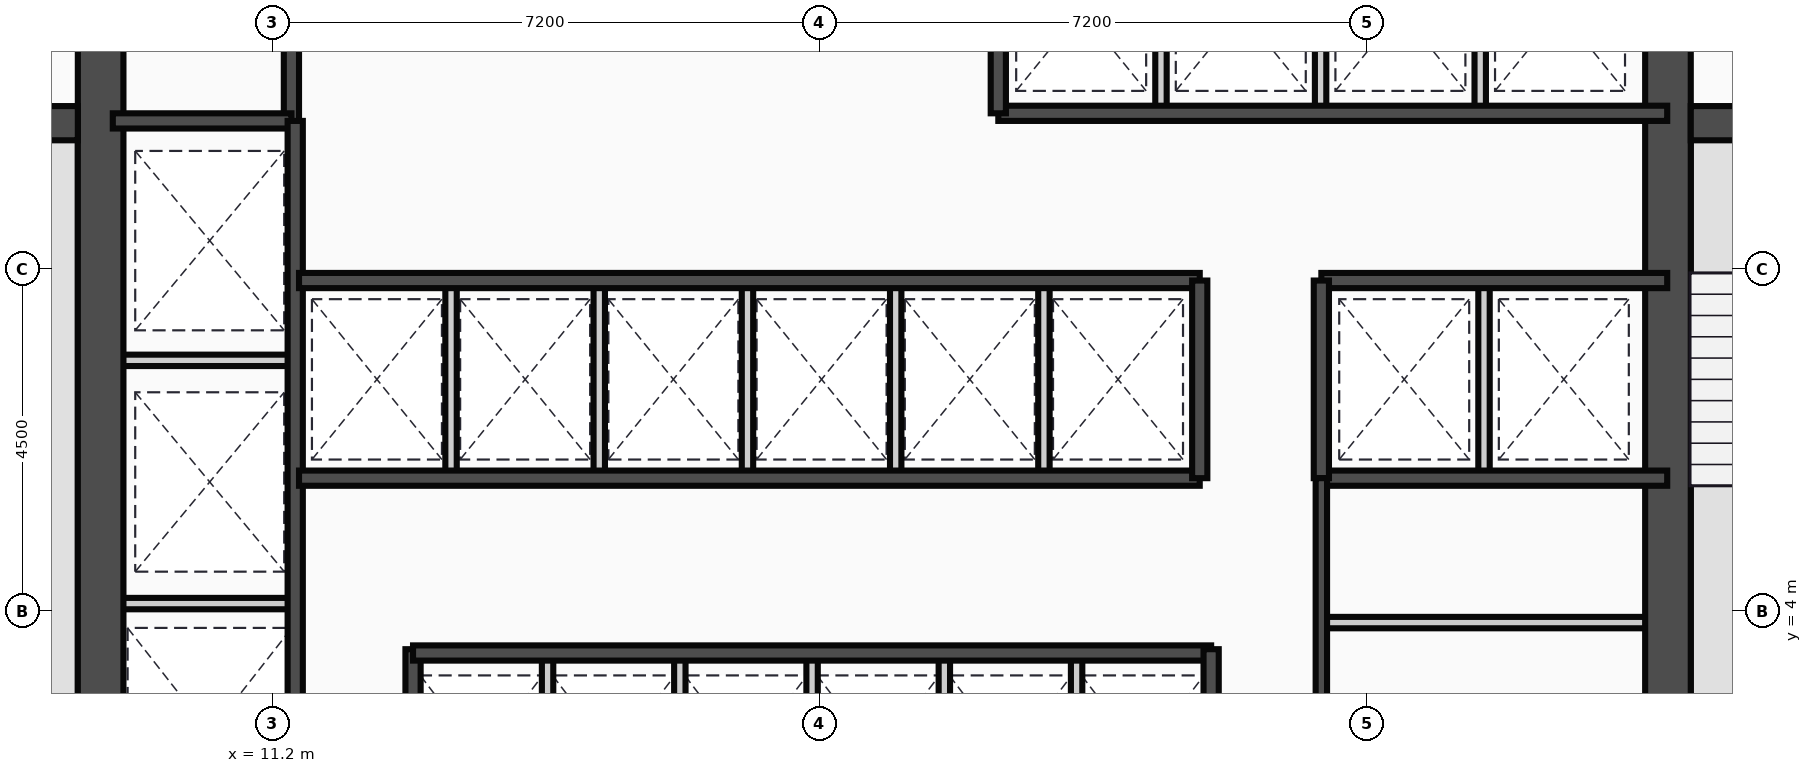
"""IFC4 building model, lengths in metres.
Left out: names, types, materials, properties, quantities, classifications, styles, units other than length and angle.
Written with IfcOpenShell. Run it as: python <this file> out.ifc"""

import sys

from ifc_helpers import new_model, si_unit, direction, frame, frame_2d, origin, place, context, subcontext, project, spatial, rectangle, extrude, source, transform, mapped, element, fill, save


model = new_model("IFC4")
c1 = context("Model", 3, precision=1e-05, world=origin(), true_north=direction((0.0, 1.0)))
c2 = subcontext(c1, "Body", "Model", "MODEL_VIEW")
j1 = project(units=[si_unit("LENGTHUNIT", "METRE"), si_unit("PLANEANGLEUNIT", "RADIAN")], contexts=[c1])
p1 = place(None, origin())
s1 = spatial("IfcSite", under=j1, at=p1, CompositionType="ELEMENT")
p2 = place(p1, origin())
s2 = spatial("IfcBuilding", under=s1, at=p2, CompositionType="ELEMENT")
p3 = place(p2, frame((0.0, 0.0, 32.5)))
s3 = spatial("IfcBuildingStorey", under=s2, at=p3, CompositionType="ELEMENT", Elevation=32.5)
m1 = source(origin(), c2, "Body", "SweptSolid", [
    extrude(rectangle(XDim=12.2, YDim=0.6, at=frame_2d((6.1, 0.0))), origin(), (0.0, 0.0, 1.0), 3.65),
])
for number, where, z_axis, x_axis in (
    (1, (8.94, 0.9, 0.0), (0.0, 0.0, 1.0), (0.0, 1.0, 0.0)),
    (2, (29.56, 0.9, 0.0), (0.0, 0.0, 1.0), (0.0, 1.0, 0.0)),
):
    element("IfcWall", number, at=place(p3, frame(where, z_axis=z_axis, x_axis=x_axis)), inside=s3, PredefinedType="SHEAR", context=c2, shape_type="MappedRepresentation", body=[
        mapped(m1, transform((0.0, 0.0, 0.0))),
    ])
m2 = source(origin(), c2, "Body", "SweptSolid", [
    extrude(rectangle(XDim=3.39, YDim=0.45, at=frame_2d((1.695, 0.0))), origin(), (0.0, 0.0, 1.0), 3.65),
])
p4 = place(p3, frame((5.25, 10.42, 0.0), z_axis=(0.0, 0.0, 1.0), x_axis=(1.0, 0.0, 0.0)))
e3 = element("IfcWall", 3, at=p4, inside=s3, PredefinedType="SHEAR", context=c2, shape_type="MappedRepresentation", body=[
    mapped(m2, transform((0.0, 0.0, 0.0))),
])
p5 = place(p4, frame((1.05, 0.0, 0.0)))
e4 = element("IfcOpeningElement", 4, at=p5, cuts=e3, PredefinedType="OPENING", context=c2, shape_type="SweptSolid", body=[
    extrude(rectangle(XDim=1.1, YDim=2.15, at=frame_2d((0.55, 1.075))), frame((0.0, 0.235, 0.0), z_axis=(0.0, -1.0, 0.0), x_axis=(1.0, 0.0, 0.0)), (0.0, 0.0, 1.0), 0.47),
])
p6 = place(p3, frame((29.86, 10.42, 0.0), z_axis=(0.0, 0.0, 1.0), x_axis=(1.0, 0.0, 0.0)))
e5 = element("IfcWall", 5, at=p6, inside=s3, PredefinedType="SHEAR", context=c2, shape_type="MappedRepresentation", body=[
    mapped(m2, transform((0.0, 0.0, 0.0))),
])
p7 = place(p6, frame((1.1, 0.0, 0.0)))
e6 = element("IfcOpeningElement", 6, at=p7, cuts=e5, PredefinedType="OPENING", context=c2, shape_type="SweptSolid", body=[
    extrude(rectangle(XDim=1.1, YDim=2.15, at=frame_2d((0.55, 1.075))), frame((0.0, 0.235, 0.0), z_axis=(0.0, -1.0, 0.0), x_axis=(1.0, 0.0, 0.0)), (0.0, 0.0, 1.0), 0.47),
])
m3 = source(origin(), c2, "Body", "SweptSolid", [
    extrude(rectangle(XDim=3.18, YDim=0.2, at=frame_2d((1.59, 0.0))), origin(), (0.0, 0.0, 1.0), 3.4),
])
p8 = place(p3, frame((11.45, 10.42, 0.0), z_axis=(0.0, 0.0, 1.0), x_axis=(0.0, 1.0, 0.0)))
e7 = element("IfcWall", 7, at=p8, inside=s3, PredefinedType="PARTITIONING", context=c2, shape_type="MappedRepresentation", body=[
    mapped(m3, transform((0.0, 0.0, 0.0))),
])
m4 = source(origin(), c2, "Body", "SweptSolid", [
    extrude(rectangle(XDim=2.35, YDim=0.2, at=frame_2d((1.175, 0.0))), origin(), (0.0, 0.0, 1.0), 3.4),
])
p9 = place(p3, frame((9.1, 10.45, 0.0), z_axis=(0.0, 0.0, 1.0), x_axis=(1.0, 0.0, 0.0)))
e8 = element("IfcWall", 8, at=p9, inside=s3, PredefinedType="PARTITIONING", context=c2, shape_type="MappedRepresentation", body=[
    mapped(m4, transform((0.0, 0.0, 0.0))),
])
p10 = place(p9, frame((0.55, 0.0, 0.0)))
e9 = element("IfcOpeningElement", 9, at=p10, cuts=e8, PredefinedType="OPENING", context=c2, shape_type="SweptSolid", body=[
    extrude(rectangle(XDim=1.1, YDim=2.15, at=frame_2d((0.55, 1.075))), frame((0.0, 0.11, 0.0), z_axis=(0.0, -1.0, 0.0), x_axis=(1.0, 0.0, 0.0)), (0.0, 0.0, 1.0), 0.22),
])
m5 = source(origin(), c2, "Body", "SweptSolid", [
    extrude(rectangle(XDim=9.6, YDim=0.2, at=frame_2d((4.8, 0.0))), origin(), (0.0, 0.0, 1.0), 3.4),
])
p11 = place(p3, frame((11.5, 0.85, 0.0), z_axis=(0.0, 0.0, 1.0), x_axis=(0.0, 1.0, 0.0)))
e10 = element("IfcWall", 10, at=p11, inside=s3, PredefinedType="PARTITIONING", context=c2, shape_type="MappedRepresentation", body=[
    mapped(m5, transform((0.0, 0.0, 0.0))),
])
p12 = place(p11, frame((4.2, 0.0, 0.0)))
e11 = element("IfcOpeningElement", 11, at=p12, cuts=e10, PredefinedType="OPENING", context=c2, shape_type="SweptSolid", body=[
    extrude(rectangle(XDim=1.1, YDim=2.15, at=frame_2d((0.55, 1.075))), frame((0.0, 0.11, 0.0), z_axis=(0.0, -1.0, 0.0), x_axis=(1.0, 0.0, 0.0)), (0.0, 0.0, 1.0), 0.22),
])
p13 = place(p11, frame((0.9, 0.0, 0.0)))
e12 = element("IfcOpeningElement", 12, at=p13, cuts=e10, PredefinedType="OPENING", context=c2, shape_type="SweptSolid", body=[
    extrude(rectangle(XDim=1.2, YDim=2.15, at=frame_2d((0.6, 1.075))), frame((0.0, 0.11, 0.0), z_axis=(0.0, -1.0, 0.0), x_axis=(1.0, 0.0, 0.0)), (0.0, 0.0, 1.0), 0.22),
])
m6 = source(origin(), c2, "Body", "SweptSolid", [
    extrude(rectangle(XDim=2.4, YDim=0.15, at=frame_2d((1.2, 0.0))), origin(), (0.0, 0.0, 1.0), 3.4),
])
for number, where, z_axis, x_axis in (
    (13, (9.1, 4.1, 0.0), (0.0, 0.0, 1.0), (1.0, 0.0, 0.0)),
    (14, (9.1, 7.3, 0.0), (0.0, 0.0, 1.0), (1.0, 0.0, 0.0)),
):
    element("IfcWall", number, at=place(p3, frame(where, z_axis=z_axis, x_axis=x_axis)), inside=s3, PredefinedType="PARTITIONING", context=c2, shape_type="MappedRepresentation", body=[
        mapped(m6, transform((0.0, 0.0, 0.0))),
    ])
m7 = source(origin(), c2, "Body", "SweptSolid", [
    extrude(rectangle(XDim=2.65, YDim=0.2, at=frame_2d((1.325, 0.0))), origin(), (0.0, 0.0, 1.0), 3.4),
])
p14 = place(p3, frame((13.05, 0.85, 0.0), z_axis=(0.0, 0.0, 1.0), x_axis=(0.0, 1.0, 0.0)))
e15 = element("IfcWall", 15, at=p14, inside=s3, PredefinedType="PARTITIONING", context=c2, shape_type="MappedRepresentation", body=[
    mapped(m7, transform((0.0, 0.0, 0.0))),
])
m8 = source(origin(), c2, "Body", "SweptSolid", [
    extrude(rectangle(XDim=10.5, YDim=0.2, at=frame_2d((5.25, 0.0))), origin(), (0.0, 0.0, 1.0), 3.4),
])
p15 = place(p3, frame((13.05, 3.45, 0.0), z_axis=(0.0, 0.0, 1.0), x_axis=(1.0, 0.0, 0.0)))
e16 = element("IfcWall", 16, at=p15, inside=s3, PredefinedType="PARTITIONING", context=c2, shape_type="MappedRepresentation", body=[
    mapped(m8, transform((0.0, 0.0, 0.0))),
])
p16 = place(p15, frame((0.38, 0.0, 0.0)))
e17 = element("IfcOpeningElement", 17, at=p16, cuts=e16, PredefinedType="OPENING", context=c2, shape_type="SweptSolid", body=[
    extrude(rectangle(XDim=1.05, YDim=2.15, at=frame_2d((0.525, 1.075))), frame((0.0, 0.11, 0.0), z_axis=(0.0, -1.0, 0.0), x_axis=(1.0, 0.0, 0.0)), (0.0, 0.0, 1.0), 0.22),
])
p17 = place(p15, frame((2.12, 0.0, 0.0)))
e18 = element("IfcOpeningElement", 18, at=p17, cuts=e16, PredefinedType="OPENING", context=c2, shape_type="SweptSolid", body=[
    extrude(rectangle(XDim=1.05, YDim=2.15, at=frame_2d((0.525, 1.075))), frame((0.0, 0.11, 0.0), z_axis=(0.0, -1.0, 0.0), x_axis=(1.0, 0.0, 0.0)), (0.0, 0.0, 1.0), 0.22),
])
p18 = place(p15, frame((3.86, 0.0, 0.0)))
e19 = element("IfcOpeningElement", 19, at=p18, cuts=e16, PredefinedType="OPENING", context=c2, shape_type="SweptSolid", body=[
    extrude(rectangle(XDim=1.05, YDim=2.15, at=frame_2d((0.525, 1.075))), frame((0.0, 0.11, 0.0), z_axis=(0.0, -1.0, 0.0), x_axis=(1.0, 0.0, 0.0)), (0.0, 0.0, 1.0), 0.22),
])
p19 = place(p15, frame((5.6, 0.0, 0.0)))
e20 = element("IfcOpeningElement", 20, at=p19, cuts=e16, PredefinedType="OPENING", context=c2, shape_type="SweptSolid", body=[
    extrude(rectangle(XDim=1.05, YDim=2.15, at=frame_2d((0.525, 1.075))), frame((0.0, 0.11, 0.0), z_axis=(0.0, -1.0, 0.0), x_axis=(1.0, 0.0, 0.0)), (0.0, 0.0, 1.0), 0.22),
])
p20 = place(p15, frame((7.34, 0.0, 0.0)))
e21 = element("IfcOpeningElement", 21, at=p20, cuts=e16, PredefinedType="OPENING", context=c2, shape_type="SweptSolid", body=[
    extrude(rectangle(XDim=1.05, YDim=2.15, at=frame_2d((0.525, 1.075))), frame((0.0, 0.11, 0.0), z_axis=(0.0, -1.0, 0.0), x_axis=(1.0, 0.0, 0.0)), (0.0, 0.0, 1.0), 0.22),
])
p21 = place(p15, frame((9.08, 0.0, 0.0)))
e22 = element("IfcOpeningElement", 22, at=p21, cuts=e16, PredefinedType="OPENING", context=c2, shape_type="SweptSolid", body=[
    extrude(rectangle(XDim=1.05, YDim=2.15, at=frame_2d((0.525, 1.075))), frame((0.0, 0.11, 0.0), z_axis=(0.0, -1.0, 0.0), x_axis=(1.0, 0.0, 0.0)), (0.0, 0.0, 1.0), 0.22),
])
p22 = place(p3, frame((23.55, 0.85, 0.0), z_axis=(0.0, 0.0, 1.0), x_axis=(0.0, 1.0, 0.0)))
e23 = element("IfcWall", 23, at=p22, inside=s3, PredefinedType="PARTITIONING", context=c2, shape_type="MappedRepresentation", body=[
    mapped(m7, transform((0.0, 0.0, 0.0))),
])
m9 = source(origin(), c2, "Body", "SweptSolid", [
    extrude(rectangle(XDim=2.6, YDim=0.15, at=frame_2d((1.3, 0.0))), origin(), (0.0, 0.0, 1.0), 3.4),
])
for number, where, z_axis, x_axis in (
    (24, (14.82, 0.85, 0.0), (0.0, 0.0, 1.0), (0.0, 1.0, 0.0)),
    (25, (16.56, 0.85, 0.0), (0.0, 0.0, 1.0), (0.0, 1.0, 0.0)),
    (26, (18.3, 0.85, 0.0), (0.0, 0.0, 1.0), (0.0, 1.0, 0.0)),
    (27, (20.04, 0.85, 0.0), (0.0, 0.0, 1.0), (0.0, 1.0, 0.0)),
    (28, (21.78, 0.85, 0.0), (0.0, 0.0, 1.0), (0.0, 1.0, 0.0)),
):
    element("IfcWall", number, at=place(p3, frame(where, z_axis=z_axis, x_axis=x_axis)), inside=s3, PredefinedType="PARTITIONING", context=c2, shape_type="MappedRepresentation", body=[
        mapped(m9, transform((0.0, 0.0, 0.0))),
    ])
m10 = source(origin(), c2, "Body", "SweptSolid", [
    extrude(rectangle(XDim=11.85, YDim=0.2, at=frame_2d((5.925, 0.0))), origin(), (0.0, 0.0, 1.0), 3.4),
])
for number, where, z_axis, x_axis in (
    (29, (11.55, 5.75, 0.0), (0.0, 0.0, 1.0), (1.0, 0.0, 0.0)),
    (30, (11.55, 8.35, 0.0), (0.0, 0.0, 1.0), (1.0, 0.0, 0.0)),
):
    element("IfcWall", number, at=place(p3, frame(where, z_axis=z_axis, x_axis=x_axis)), inside=s3, PredefinedType="PARTITIONING", context=c2, shape_type="MappedRepresentation", body=[
        mapped(m10, transform((0.0, 0.0, 0.0))),
    ])
m11 = source(origin(), c2, "Body", "SweptSolid", [
    extrude(rectangle(XDim=2.6, YDim=0.2, at=frame_2d((1.3, 0.0))), origin(), (0.0, 0.0, 1.0), 3.4),
])
p23 = place(p3, frame((23.4, 5.75, 0.0), z_axis=(0.0, 0.0, 1.0), x_axis=(0.0, 1.0, 0.0)))
e31 = element("IfcWall", 31, at=p23, inside=s3, PredefinedType="PARTITIONING", context=c2, shape_type="MappedRepresentation", body=[
    mapped(m11, transform((0.0, 0.0, 0.0))),
])
m12 = source(origin(), c2, "Body", "SweptSolid", [
    extrude(rectangle(XDim=2.5, YDim=0.15, at=frame_2d((1.25, 0.0))), origin(), (0.0, 0.0, 1.0), 3.4),
])
for number, where, z_axis, x_axis in (
    (32, (13.55, 5.8, 0.0), (0.0, 0.0, 1.0), (0.0, 1.0, 0.0)),
    (33, (15.5, 5.8, 0.0), (0.0, 0.0, 1.0), (0.0, 1.0, 0.0)),
    (34, (17.45, 5.8, 0.0), (0.0, 0.0, 1.0), (0.0, 1.0, 0.0)),
    (35, (19.4, 5.8, 0.0), (0.0, 0.0, 1.0), (0.0, 1.0, 0.0)),
    (36, (21.35, 5.8, 0.0), (0.0, 0.0, 1.0), (0.0, 1.0, 0.0)),
):
    element("IfcWall", number, at=place(p3, frame(where, z_axis=z_axis, x_axis=x_axis)), inside=s3, PredefinedType="PARTITIONING", context=c2, shape_type="MappedRepresentation", body=[
        mapped(m12, transform((0.0, 0.0, 0.0))),
    ])
m13 = source(origin(), c2, "Body", "SweptSolid", [
    extrude(rectangle(XDim=8.8, YDim=0.2, at=frame_2d((4.4, 0.0))), origin(), (0.0, 0.0, 1.0), 3.4),
])
p24 = place(p3, frame((20.75, 10.55, 0.0), z_axis=(0.0, 0.0, 1.0), x_axis=(1.0, 0.0, 0.0)))
e37 = element("IfcWall", 37, at=p24, inside=s3, PredefinedType="PARTITIONING", context=c2, shape_type="MappedRepresentation", body=[
    mapped(m13, transform((0.0, 0.0, 0.0))),
])
m14 = source(origin(), c2, "Body", "SweptSolid", [
    extrude(rectangle(XDim=3.0, YDim=0.2, at=frame_2d((1.5, 0.0))), origin(), (0.0, 0.0, 1.0), 3.4),
])
p25 = place(p3, frame((20.75, 10.55, 0.0), z_axis=(0.0, 0.0, 1.0), x_axis=(0.0, 1.0, 0.0)))
e38 = element("IfcWall", 38, at=p25, inside=s3, PredefinedType="PARTITIONING", context=c2, shape_type="MappedRepresentation", body=[
    mapped(m14, transform((0.0, 0.0, 0.0))),
])
m15 = source(origin(), c2, "Body", "SweptSolid", [
    extrude(rectangle(XDim=2.85, YDim=0.15, at=frame_2d((1.425, 0.0))), origin(), (0.0, 0.0, 1.0), 3.4),
])
for number, where, z_axis, x_axis in (
    (39, (22.89, 10.6, 0.0), (0.0, 0.0, 1.0), (0.0, 1.0, 0.0)),
    (40, (24.99, 10.6, 0.0), (0.0, 0.0, 1.0), (0.0, 1.0, 0.0)),
    (41, (27.09, 10.6, 0.0), (0.0, 0.0, 1.0), (0.0, 1.0, 0.0)),
):
    element("IfcWall", number, at=place(p3, frame(where, z_axis=z_axis, x_axis=x_axis)), inside=s3, PredefinedType="PARTITIONING", context=c2, shape_type="MappedRepresentation", body=[
        mapped(m15, transform((0.0, 0.0, 0.0))),
    ])
m16 = source(origin(), c2, "Body", "SweptSolid", [
    extrude(rectangle(XDim=4.55, YDim=0.2, at=frame_2d((2.275, 0.0))), origin(), (0.0, 0.0, 1.0), 3.4),
])
for number, where, z_axis, x_axis in (
    (42, (25.0, 8.35, 0.0), (0.0, 0.0, 1.0), (1.0, 0.0, 0.0)),
    (43, (25.0, 5.75, 0.0), (0.0, 0.0, 1.0), (1.0, 0.0, 0.0)),
):
    element("IfcWall", number, at=place(p3, frame(where, z_axis=z_axis, x_axis=x_axis)), inside=s3, PredefinedType="PARTITIONING", context=c2, shape_type="MappedRepresentation", body=[
        mapped(m16, transform((0.0, 0.0, 0.0))),
    ])
p26 = place(p3, frame((25.0, 5.75, 0.0), z_axis=(0.0, 0.0, 1.0), x_axis=(0.0, 1.0, 0.0)))
e44 = element("IfcWall", 44, at=p26, inside=s3, PredefinedType="PARTITIONING", context=c2, shape_type="MappedRepresentation", body=[
    mapped(m11, transform((0.0, 0.0, 0.0))),
])
p27 = place(p3, frame((27.14, 5.8, 0.0), z_axis=(0.0, 0.0, 1.0), x_axis=(0.0, 1.0, 0.0)))
e45 = element("IfcWall", 45, at=p27, inside=s3, PredefinedType="PARTITIONING", context=c2, shape_type="MappedRepresentation", body=[
    mapped(m12, transform((0.0, 0.0, 0.0))),
])
m17 = source(origin(), c2, "Body", "SweptSolid", [
    extrude(rectangle(XDim=4.9, YDim=0.15, at=frame_2d((2.45, 0.0))), origin(), (0.0, 0.0, 1.0), 3.4),
])
p28 = place(p3, frame((25.0, 0.85, 0.0), z_axis=(0.0, 0.0, 1.0), x_axis=(0.0, 1.0, 0.0)))
e46 = element("IfcWall", 46, at=p28, inside=s3, PredefinedType="PARTITIONING", context=c2, shape_type="MappedRepresentation", body=[
    mapped(m17, transform((0.0, 0.0, 0.0))),
])
p29 = place(p28, frame((1.8, 0.0, 0.0)))
e47 = element("IfcOpeningElement", 47, at=p29, cuts=e46, PredefinedType="OPENING", context=c2, shape_type="SweptSolid", body=[
    extrude(rectangle(XDim=0.95, YDim=2.15, at=frame_2d((0.475, 1.075))), frame((0.0, 0.085, 0.0), z_axis=(0.0, -1.0, 0.0), x_axis=(1.0, 0.0, 0.0)), (0.0, 0.0, 1.0), 0.17),
])
p30 = place(p28, frame((3.45, 0.0, 0.0)))
e48 = element("IfcOpeningElement", 48, at=p30, cuts=e46, PredefinedType="OPENING", context=c2, shape_type="SweptSolid", body=[
    extrude(rectangle(XDim=0.95, YDim=2.15, at=frame_2d((0.475, 1.075))), frame((0.0, 0.085, 0.0), z_axis=(0.0, -1.0, 0.0), x_axis=(1.0, 0.0, 0.0)), (0.0, 0.0, 1.0), 0.17),
])
m18 = source(origin(), c2, "Body", "SweptSolid", [
    extrude(rectangle(XDim=4.55, YDim=0.15, at=frame_2d((2.275, 0.0))), origin(), (0.0, 0.0, 1.0), 3.4),
])
p31 = place(p3, frame((25.0, 3.85, 0.0), z_axis=(0.0, 0.0, 1.0), x_axis=(1.0, 0.0, 0.0)))
e49 = element("IfcWall", 49, at=p31, inside=s3, PredefinedType="PARTITIONING", context=c2, shape_type="MappedRepresentation", body=[
    mapped(m18, transform((0.0, 0.0, 0.0))),
])
m19 = source(origin(), c2, "Body", "SweptSolid", [
    extrude(rectangle(XDim=1.1, YDim=2.15, at=frame_2d((0.55, 1.075))), frame((0.0, 0.025, 0.0), z_axis=(0.0, -1.0, 0.0), x_axis=(1.0, 0.0, 0.0)), (0.0, 0.0, 1.0), 0.05),
])
p32 = place(p10, origin())
e50 = element("IfcDoor", 50, at=p32, inside=s3, OperationType="SLIDING_TO_LEFT", PredefinedType="DOOR", context=c2, shape_type="MappedRepresentation", body=[
    mapped(m19, transform((0.0, 0.0, 0.0))),
])
fill(e9, e50)
p33 = place(p12, frame((1.1, 0.0, 0.0), z_axis=(0.0, 0.0, 1.0), x_axis=(-1.0, 0.0, 0.0)))
e51 = element("IfcDoor", 51, at=p33, inside=s3, OperationType="SLIDING_TO_LEFT", PredefinedType="DOOR", context=c2, shape_type="MappedRepresentation", body=[
    mapped(m19, transform((0.0, 0.0, 0.0))),
])
fill(e11, e51)
m20 = source(origin(), c2, "Body", "SweptSolid", [
    extrude(rectangle(XDim=1.2, YDim=2.15, at=frame_2d((0.6, 1.075))), frame((0.0, 0.025, 0.0), z_axis=(0.0, -1.0, 0.0), x_axis=(1.0, 0.0, 0.0)), (0.0, 0.0, 1.0), 0.05),
])
p34 = place(p13, frame((1.2, 0.0, 0.0), z_axis=(0.0, 0.0, 1.0), x_axis=(-1.0, 0.0, 0.0)))
e52 = element("IfcDoor", 52, at=p34, inside=s3, OperationType="SLIDING_TO_LEFT", PredefinedType="DOOR", context=c2, shape_type="MappedRepresentation", body=[
    mapped(m20, transform((0.0, 0.0, 0.0))),
])
fill(e12, e52)
m21 = source(origin(), c2, "Body", "SweptSolid", [
    extrude(rectangle(XDim=1.05, YDim=2.15, at=frame_2d((0.525, 1.075))), frame((0.0, 0.025, 0.0), z_axis=(0.0, -1.0, 0.0), x_axis=(1.0, 0.0, 0.0)), (0.0, 0.0, 1.0), 0.05),
])
p35 = place(p16, origin())
e53 = element("IfcDoor", 53, at=p35, inside=s3, OperationType="SLIDING_TO_LEFT", PredefinedType="DOOR", context=c2, shape_type="MappedRepresentation", body=[
    mapped(m21, transform((0.0, 0.0, 0.0))),
])
fill(e17, e53)
p36 = place(p17, origin())
e54 = element("IfcDoor", 54, at=p36, inside=s3, OperationType="SLIDING_TO_LEFT", PredefinedType="DOOR", context=c2, shape_type="MappedRepresentation", body=[
    mapped(m21, transform((0.0, 0.0, 0.0))),
])
fill(e18, e54)
p37 = place(p18, origin())
e55 = element("IfcDoor", 55, at=p37, inside=s3, OperationType="SLIDING_TO_LEFT", PredefinedType="DOOR", context=c2, shape_type="MappedRepresentation", body=[
    mapped(m21, transform((0.0, 0.0, 0.0))),
])
fill(e19, e55)
p38 = place(p19, origin())
e56 = element("IfcDoor", 56, at=p38, inside=s3, OperationType="SLIDING_TO_LEFT", PredefinedType="DOOR", context=c2, shape_type="MappedRepresentation", body=[
    mapped(m21, transform((0.0, 0.0, 0.0))),
])
fill(e20, e56)
p39 = place(p20, origin())
e57 = element("IfcDoor", 57, at=p39, inside=s3, OperationType="SLIDING_TO_LEFT", PredefinedType="DOOR", context=c2, shape_type="MappedRepresentation", body=[
    mapped(m21, transform((0.0, 0.0, 0.0))),
])
fill(e21, e57)
p40 = place(p21, origin())
e58 = element("IfcDoor", 58, at=p40, inside=s3, OperationType="SLIDING_TO_LEFT", PredefinedType="DOOR", context=c2, shape_type="MappedRepresentation", body=[
    mapped(m21, transform((0.0, 0.0, 0.0))),
])
fill(e22, e58)
m22 = source(origin(), c2, "Body", "SweptSolid", [
    extrude(rectangle(XDim=0.95, YDim=2.15, at=frame_2d((0.475, 1.075))), frame((0.0, 0.025, 0.0), z_axis=(0.0, -1.0, 0.0), x_axis=(1.0, 0.0, 0.0)), (0.0, 0.0, 1.0), 0.05),
])
p41 = place(p29, origin())
e59 = element("IfcDoor", 59, at=p41, inside=s3, OperationType="SINGLE_SWING_LEFT", PredefinedType="DOOR", context=c2, shape_type="MappedRepresentation", body=[
    mapped(m22, transform((0.0, 0.0, 0.0))),
])
fill(e47, e59)
p42 = place(p30, origin())
e60 = element("IfcDoor", 60, at=p42, inside=s3, OperationType="SINGLE_SWING_RIGHT", PredefinedType="DOOR", context=c2, shape_type="MappedRepresentation", body=[
    mapped(m22, transform((0.0, 0.0, 0.0))),
])
fill(e48, e60)
save(model, sys.argv[1])
